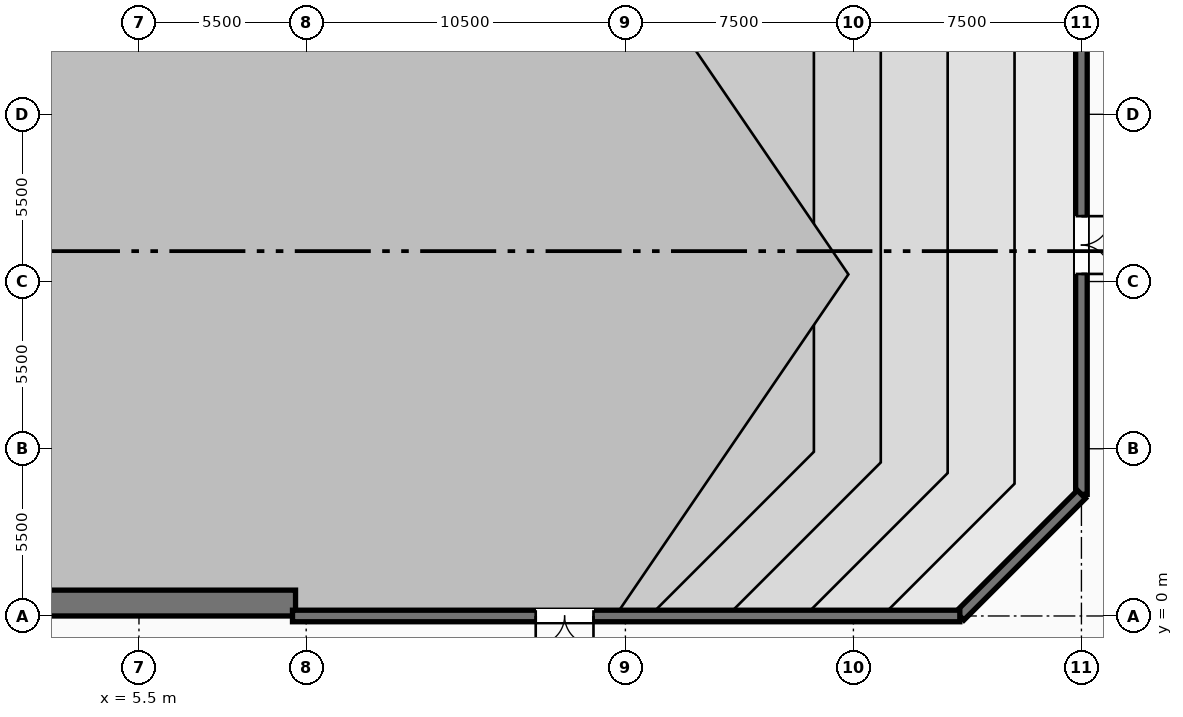
"""IFC4 building model, lengths in metres.
Left out: names, types, materials, properties, quantities, classifications, styles, units other than length and angle.
Written with IfcOpenShell. Run it as: python <this file> out.ifc"""

import sys

from ifc_helpers import new_model, si_unit, direction, frame, frame_2d, origin, origin_2d, place, context, subcontext, project, spatial, rectangle, hollow_rectangle, extrude, source, transform, mapped, element, fill, save


model = new_model("IFC4")
c1 = context("Model", 3, precision=1e-05, world=origin(), true_north=direction((0.0, 1.0)))
c2 = subcontext(c1, "Body", "Model", "MODEL_VIEW")
j1 = project(units=[si_unit("LENGTHUNIT", "METRE"), si_unit("PLANEANGLEUNIT", "RADIAN")], contexts=[c1])
p1 = place(None, origin())
s1 = spatial("IfcSite", under=j1, at=p1, CompositionType="ELEMENT")
p2 = place(p1, origin())
s2 = spatial("IfcBuilding", under=s1, at=p2, CompositionType="ELEMENT")
p3 = place(p2, origin())
s3 = spatial("IfcBuildingStorey", under=s2, at=p3, CompositionType="ELEMENT", Elevation=0.0)
p4 = place(p3, frame((-10.65, 0.425, 0.0), z_axis=(0.0, 0.0, 1.0), x_axis=(1.0, 0.0, 0.0)))
e1 = element("IfcWall", 1, at=p4, inside=s3, PredefinedType="SHEAR", context=c2, shape_type="SweptSolid", body=[
    extrude(rectangle(XDim=21.3, YDim=0.85, at=frame_2d((10.65, 0.0))), origin(), (0.0, 0.0, 1.0), 5.15),
])
p5 = place(p3, frame((-11.0, 16.175, 0.0), z_axis=(0.0, 0.0, 1.0), x_axis=(1.0, 0.0, 0.0)))
e2 = element("IfcWall", 2, at=p5, inside=s3, PredefinedType="SHEAR", context=c2, shape_type="SweptSolid", body=[
    extrude(rectangle(XDim=22.0, YDim=0.85, at=frame_2d((11.0, 0.0))), origin(), (0.0, 0.0, 1.0), 5.15),
])
p6 = place(p5, frame((3.57, 0.0, 0.0)))
e3 = element("IfcOpeningElement", 3, at=p6, cuts=e2, PredefinedType="OPENING", context=c2, shape_type="SweptSolid", body=[
    extrude(rectangle(XDim=1.3, YDim=2.3, at=frame_2d((0.65, 1.15))), frame((0.0, 0.435, 0.0), z_axis=(0.0, -1.0, 0.0), x_axis=(1.0, 0.0, 0.0)), (0.0, 0.0, 1.0), 0.87),
])
p7 = place(p5, frame((10.0, 0.0, 0.0)))
e4 = element("IfcOpeningElement", 4, at=p7, cuts=e2, PredefinedType="OPENING", context=c2, shape_type="SweptSolid", body=[
    extrude(rectangle(XDim=2.0, YDim=2.4, at=frame_2d((1.0, 1.2))), frame((0.0, 0.435, 0.0), z_axis=(0.0, -1.0, 0.0), x_axis=(1.0, 0.0, 0.0)), (0.0, 0.0, 1.0), 0.87),
])
p8 = place(p3, frame((10.575, 0.425, 0.0), z_axis=(0.0, 0.0, 1.0), x_axis=(0.0, 1.0, 0.0)))
e5 = element("IfcWall", 5, at=p8, inside=s3, PredefinedType="SHEAR", context=c2, shape_type="SweptSolid", body=[
    extrude(rectangle(XDim=15.75, YDim=0.85, at=frame_2d((7.875, 0.0))), origin(), (0.0, 0.0, 1.0), 5.15),
])
p9 = place(p8, frame((9.125, 0.0, 0.0)))
e6 = element("IfcOpeningElement", 6, at=p9, cuts=e5, PredefinedType="OPENING", context=c2, shape_type="SweptSolid", body=[
    extrude(rectangle(XDim=1.1, YDim=2.2, at=frame_2d((0.55, 1.1))), frame((0.0, 0.435, 0.0), z_axis=(0.0, -1.0, 0.0), x_axis=(1.0, 0.0, 0.0)), (0.0, 0.0, 1.0), 0.87),
])
p10 = place(p3, frame((5.5, 0.425, 0.0), z_axis=(0.0, 0.0, 1.0), x_axis=(0.0, 1.0, 0.0)))
e7 = element("IfcWall", 7, at=p10, inside=s3, PredefinedType="SHEAR", context=c2, shape_type="SweptSolid", body=[
    extrude(rectangle(XDim=15.75, YDim=0.4, at=frame_2d((7.875, 0.0))), origin(), (0.0, 0.0, 1.0), 5.15),
])
p11 = place(p10, frame((9.075, 0.0, 0.0)))
e8 = element("IfcOpeningElement", 8, at=p11, cuts=e7, PredefinedType="OPENING", context=c2, shape_type="SweptSolid", body=[
    extrude(rectangle(XDim=1.1, YDim=2.2, at=frame_2d((0.55, 1.1))), frame((0.0, 0.21, 0.0), z_axis=(0.0, -1.0, 0.0), x_axis=(1.0, 0.0, 0.0)), (0.0, 0.0, 1.0), 0.42),
])
m1 = source(origin(), c2, "Body", "SweptSolid", [
    extrude(rectangle(XDim=0.45, YDim=0.95, at=origin_2d()), origin(), (0.0, 0.0, 1.0), 5.5),
])
for number, where, z_axis, x_axis in (
    (9, (5.5, 0.45, 0.0), (0.0, 0.0, 1.0), (1.0, 0.0, 0.0)),
    (10, (10.65, 0.3, 0.0), (0.0, 0.0, 1.0), (1.0, 0.0, 0.0)),
    (11, (5.5, 16.05, 0.0), (0.0, 0.0, 1.0), (1.0, 0.0, 0.0)),
):
    element("IfcColumn", number, at=place(p3, frame(where, z_axis=z_axis, x_axis=x_axis)), inside=s3, PredefinedType="PILASTER", context=c2, shape_type="MappedRepresentation", body=[
        mapped(m1, transform((0.0, 0.0, 0.0), scale=1.0)),
    ])
m2 = source(origin(), c2, "Body", "SweptSolid", [
    extrude(rectangle(XDim=0.85, YDim=1.15, at=origin_2d()), origin(), (0.0, 0.0, 1.0), 5.5),
])
for number, where, z_axis, x_axis in (
    (12, (22.446, 0.0, 0.0), (0.0, 0.0, 1.0), (1.0, 0.0, 0.0)),
    (13, (21.5, 8.2, 0.0), (0.0, 0.0, 1.0), (1.0, 0.0, 0.0)),
    (14, (31.8, 16.5, 0.0), (0.0, 0.0, 1.0), (1.0, 0.0, 0.0)),
):
    element("IfcColumn", number, at=place(p3, frame(where, z_axis=z_axis, x_axis=x_axis)), inside=s3, PredefinedType="COLUMN", context=c2, shape_type="MappedRepresentation", body=[
        mapped(m2, transform((0.0, 0.0, 0.0), scale=1.0)),
    ])
m3 = source(origin(), c2, "Body", "SweptSolid", [
    extrude(hollow_rectangle(XDim=1.4, YDim=1.4, WallThickness=0.07, at=origin_2d()), origin(), (0.0, 0.0, 1.0), 5.5),
])
for number, where, z_axis, x_axis in (
    (15, (21.5, 16.5, 0.0), (0.0, 0.0, 1.0), (1.0, 0.0, 0.0)),
    (16, (31.8, 5.2, 0.0), (0.0, 0.0, 1.0), (1.0, 0.0, 0.0)),
    (17, (30.573, 11.687, 0.0), (0.0, 0.0, 1.0), (1.0, 0.0, 0.0)),
):
    element("IfcColumn", number, at=place(p3, frame(where, z_axis=z_axis, x_axis=x_axis)), inside=s3, PredefinedType="COLUMN", context=c2, shape_type="MappedRepresentation", body=[
        mapped(m3, transform((0.0, 0.0, 0.0), scale=1.0)),
    ])
p12 = place(p3, frame((36.5, 46.0, 0.0), z_axis=(0.0, 0.0, 1.0), x_axis=(0.0, -1.0, 0.0)))
e18 = element("IfcWall", 18, at=p12, inside=s3, PredefinedType="SOLIDWALL", context=c2, shape_type="SweptSolid", body=[
    extrude(rectangle(XDim=42.0, YDim=0.38, at=frame_2d((21.0, 0.0))), origin(), (0.0, 0.0, 1.0), 4.09),
])
p13 = place(p12, frame((32.85, 0.0, 0.0)))
e19 = element("IfcOpeningElement", 19, at=p13, cuts=e18, PredefinedType="OPENING", context=c2, shape_type="SweptSolid", body=[
    extrude(rectangle(XDim=1.9, YDim=2.3, at=frame_2d((0.95, 1.15))), frame((0.0, 0.2, 0.0), z_axis=(0.0, -1.0, 0.0), x_axis=(1.0, 0.0, 0.0)), (0.0, 0.0, 1.0), 0.4),
])
p14 = place(p12, frame((11.55, 0.0, 0.0)))
e20 = element("IfcOpeningElement", 20, at=p14, cuts=e18, PredefinedType="OPENING", context=c2, shape_type="SweptSolid", body=[
    extrude(rectangle(XDim=1.9, YDim=2.3, at=frame_2d((0.95, 1.15))), frame((0.0, 0.2, 0.0), z_axis=(0.0, -1.0, 0.0), x_axis=(1.0, 0.0, 0.0)), (0.0, 0.0, 1.0), 0.4),
])
p15 = place(p3, frame((36.5, 4.0, 0.0), z_axis=(0.0, 0.0, 1.0), x_axis=(-0.707106781187, -0.707106781187, 0.0)))
e21 = element("IfcWall", 21, at=p15, inside=s3, PredefinedType="SOLIDWALL", context=c2, shape_type="SweptSolid", body=[
    extrude(rectangle(XDim=5.657, YDim=0.38, at=frame_2d((2.828, 0.0))), origin(), (0.0, 0.0, 1.0), 4.09),
])
p16 = place(p3, frame((32.5, 0.0, 0.0), z_axis=(0.0, 0.0, 1.0), x_axis=(-1.0, 0.0, 0.0)))
e22 = element("IfcWall", 22, at=p16, inside=s3, PredefinedType="SOLIDWALL", context=c2, shape_type="SweptSolid", body=[
    extrude(rectangle(XDim=21.95, YDim=0.38, at=frame_2d((10.975, 0.0))), origin(), (0.0, 0.0, 1.0), 4.09),
])
p17 = place(p16, frame((12.05, 0.0, 0.0)))
e23 = element("IfcOpeningElement", 23, at=p17, cuts=e22, PredefinedType="OPENING", context=c2, shape_type="SweptSolid", body=[
    extrude(rectangle(XDim=1.9, YDim=2.3, at=frame_2d((0.95, 1.15))), frame((0.0, 0.2, 0.0), z_axis=(0.0, -1.0, 0.0), x_axis=(1.0, 0.0, 0.0)), (0.0, 0.0, 1.0), 0.4),
])
p18 = place(p3, frame((6.85, 0.85, 0.0), z_axis=(0.0, 0.0, 1.0), x_axis=(0.0, 1.0, 0.0)))
e24 = element("IfcWall", 24, at=p18, inside=s3, PredefinedType="SOLIDWALL", context=c2, shape_type="SweptSolid", body=[
    extrude(rectangle(XDim=7.5, YDim=0.25, at=frame_2d((3.75, 0.0))), origin(), (0.0, 0.0, 1.0), 5.15),
])
p19 = place(p3, frame((5.5, 8.35, 0.0), z_axis=(0.0, 0.0, 1.0), x_axis=(1.0, 0.0, 0.0)))
e25 = element("IfcWall", 25, at=p19, inside=s3, PredefinedType="SOLIDWALL", context=c2, shape_type="SweptSolid", body=[
    extrude(rectangle(XDim=4.65, YDim=0.22, at=frame_2d((2.325, 0.0))), origin(), (0.0, 0.0, 1.0), 5.15),
])
p20 = place(p19, frame((2.5, 0.0, 0.0)))
e26 = element("IfcOpeningElement", 26, at=p20, cuts=e25, PredefinedType="OPENING", context=c2, shape_type="SweptSolid", body=[
    extrude(rectangle(XDim=1.15, YDim=2.2, at=frame_2d((0.575, 1.1))), frame((0.0, 0.12, 0.0), z_axis=(0.0, -1.0, 0.0), x_axis=(1.0, 0.0, 0.0)), (0.0, 0.0, 1.0), 0.24),
])
p21 = place(p3, frame((10.15, 11.87, 0.0), z_axis=(0.0, 0.0, 1.0), x_axis=(-1.0, 0.0, 0.0)))
e27 = element("IfcWall", 27, at=p21, inside=s3, PredefinedType="SOLIDWALL", context=c2, shape_type="SweptSolid", body=[
    extrude(rectangle(XDim=4.65, YDim=0.25, at=frame_2d((2.325, 0.0))), origin(), (0.0, 0.0, 1.0), 5.15),
])
p22 = place(p21, frame((0.5, 0.0, 0.0)))
e28 = element("IfcOpeningElement", 28, at=p22, cuts=e27, PredefinedType="OPENING", context=c2, shape_type="SweptSolid", body=[
    extrude(rectangle(XDim=1.2, YDim=2.25, at=frame_2d((0.6, 1.125))), frame((0.0, 0.135, 0.0), z_axis=(0.0, -1.0, 0.0), x_axis=(1.0, 0.0, 0.0)), (0.0, 0.0, 1.0), 0.27),
])
p23 = place(p3, frame((7.84, 11.87, 0.0), z_axis=(0.0, 0.0, 1.0), x_axis=(0.0, 1.0, 0.0)))
e29 = element("IfcWall", 29, at=p23, inside=s3, PredefinedType="SOLIDWALL", context=c2, shape_type="SweptSolid", body=[
    extrude(rectangle(XDim=3.88, YDim=0.22, at=frame_2d((1.94, 0.0))), origin(), (0.0, 0.0, 1.0), 5.15),
])
p24 = place(p3, frame((3.54, 5.383, 0.0), z_axis=(0.0, 0.0, 1.0), x_axis=(0.0, 1.0, 0.0)))
e30 = element("IfcWall", 30, at=p24, inside=s3, PredefinedType="PARTITIONING", context=c2, shape_type="SweptSolid", body=[
    extrude(rectangle(XDim=2.875, YDim=0.165, at=frame_2d((1.438, 0.0))), origin(), (0.0, 0.0, 1.0), 5.142),
])
p25 = place(p24, frame((1.294, 0.0, 0.0)))
e31 = element("IfcOpeningElement", 31, at=p25, cuts=e30, PredefinedType="OPENING", context=c2, shape_type="SweptSolid", body=[
    extrude(rectangle(XDim=0.9, YDim=2.1, at=frame_2d((0.45, 1.05))), frame((0.0, 0.093, 0.0), z_axis=(0.0, -1.0, 0.0), x_axis=(1.0, 0.0, 0.0)), (0.0, 0.0, 1.0), 0.185),
])
p26 = place(p3, frame((3.54, 8.34, 0.0), z_axis=(0.0, 0.0, 1.0), x_axis=(1.0, 0.0, 0.0)))
e32 = element("IfcWall", 32, at=p26, inside=s3, PredefinedType="PARTITIONING", context=c2, shape_type="SweptSolid", body=[
    extrude(rectangle(XDim=1.88, YDim=0.165, at=frame_2d((0.94, 0.0))), origin(), (0.0, 0.0, 1.0), 5.142),
])
p27 = place(p3, frame((1.8, 5.3, 0.0), z_axis=(0.0, 0.0, 1.0), x_axis=(1.0, 0.0, 0.0)))
e33 = element("IfcWall", 33, at=p27, inside=s3, PredefinedType="PARTITIONING", context=c2, shape_type="SweptSolid", body=[
    extrude(rectangle(XDim=3.62, YDim=0.165, at=frame_2d((1.81, 0.0))), origin(), (0.0, 0.0, 1.0), 5.142),
])
p28 = place(p27, frame((0.48, 0.0, 0.0)))
e34 = element("IfcOpeningElement", 34, at=p28, cuts=e33, PredefinedType="OPENING", context=c2, shape_type="SweptSolid", body=[
    extrude(rectangle(XDim=0.9, YDim=2.1, at=frame_2d((0.45, 1.05))), frame((0.0, 0.093, 0.0), z_axis=(0.0, -1.0, 0.0), x_axis=(1.0, 0.0, 0.0)), (0.0, 0.0, 1.0), 0.185),
])
p29 = place(p3, frame((3.54, 11.22, 0.0), z_axis=(0.0, 0.0, 1.0), x_axis=(0.0, 1.0, 0.0)))
e35 = element("IfcWall", 35, at=p29, inside=s3, PredefinedType="PARTITIONING", context=c2, shape_type="SweptSolid", body=[
    extrude(rectangle(XDim=4.53, YDim=0.165, at=frame_2d((2.265, 0.0))), origin(), (0.0, 0.0, 1.0), 5.142),
])
p30 = place(p29, frame((0.55, 0.0, 0.0)))
e36 = element("IfcOpeningElement", 36, at=p30, cuts=e35, PredefinedType="OPENING", context=c2, shape_type="SweptSolid", body=[
    extrude(rectangle(XDim=0.9, YDim=2.1, at=frame_2d((0.45, 1.05))), frame((0.0, 0.093, 0.0), z_axis=(0.0, -1.0, 0.0), x_axis=(1.0, 0.0, 0.0)), (0.0, 0.0, 1.0), 0.185),
])
p31 = place(p29, frame((2.85, 0.0, 0.0)))
e37 = element("IfcOpeningElement", 37, at=p31, cuts=e35, PredefinedType="OPENING", context=c2, shape_type="SweptSolid", body=[
    extrude(rectangle(XDim=0.9, YDim=2.1, at=frame_2d((0.45, 1.05))), frame((0.0, 0.093, 0.0), z_axis=(0.0, -1.0, 0.0), x_axis=(1.0, 0.0, 0.0)), (0.0, 0.0, 1.0), 0.185),
])
p32 = place(p3, frame((3.54, 11.22, 0.0), z_axis=(0.0, 0.0, 1.0), x_axis=(1.0, 0.0, 0.0)))
e38 = element("IfcWall", 38, at=p32, inside=s3, PredefinedType="PARTITIONING", context=c2, shape_type="SweptSolid", body=[
    extrude(rectangle(XDim=1.88, YDim=0.165, at=frame_2d((0.94, 0.0))), origin(), (0.0, 0.0, 1.0), 5.142),
])
p33 = place(p3, frame((3.54, 13.48, 0.0), z_axis=(0.0, 0.0, 1.0), x_axis=(1.0, 0.0, 0.0)))
e39 = element("IfcWall", 39, at=p33, inside=s3, PredefinedType="PARTITIONING", context=c2, shape_type="SweptSolid", body=[
    extrude(rectangle(XDim=1.88, YDim=0.14, at=frame_2d((0.94, 0.0))), origin(), (0.0, 0.0, 1.0), 5.142),
])
for number, where, z_axis, x_axis in (
    (40, (24.48, 6.68, 0.0), (0.0, 0.0, 1.0), (0.0, 1.0, 0.0)),
    (41, (28.92, 6.68, 0.0), (0.0, 0.0, 1.0), (0.0, 1.0, 0.0)),
):
    element("IfcWall", number, at=place(p3, frame(where, z_axis=z_axis, x_axis=x_axis)), inside=s3, PredefinedType="SOLIDWALL", context=c2, shape_type="SweptSolid", body=[
        extrude(rectangle(XDim=8.44, YDim=0.25, at=frame_2d((4.22, 0.0))), origin(), (0.0, 0.0, 1.0), 5.15),
    ])
p34 = place(p3, frame((28.92, 6.68, 0.0), z_axis=(0.0, 0.0, 1.0), x_axis=(-1.0, 0.0, 0.0)))
e42 = element("IfcWall", 42, at=p34, inside=s3, PredefinedType="SOLIDWALL", context=c2, shape_type="SweptSolid", body=[
    extrude(rectangle(XDim=4.44, YDim=0.25, at=frame_2d((2.22, 0.0))), origin(), (0.0, 0.0, 1.0), 5.15),
])
p35 = place(p3, frame((24.48, 15.12, 0.0), z_axis=(0.0, 0.0, 1.0), x_axis=(1.0, 0.0, 0.0)))
e43 = element("IfcWall", 43, at=p35, inside=s3, PredefinedType="SOLIDWALL", context=c2, shape_type="SweptSolid", body=[
    extrude(rectangle(XDim=4.44, YDim=0.25, at=frame_2d((2.22, 0.0))), origin(), (0.0, 0.0, 1.0), 5.15),
])
p36 = place(p35, frame((1.645, 0.0, 0.0)))
e44 = element("IfcOpeningElement", 44, at=p36, cuts=e43, PredefinedType="OPENING", context=c2, shape_type="SweptSolid", body=[
    extrude(rectangle(XDim=1.15, YDim=2.2, at=frame_2d((0.575, 1.1))), frame((0.0, 0.135, 0.0), z_axis=(0.0, -1.0, 0.0), x_axis=(1.0, 0.0, 0.0)), (0.0, 0.0, 1.0), 0.27),
])
p37 = place(p3, frame((11.02, 5.8, 0.0), z_axis=(0.0, 0.0, 1.0), x_axis=(1.0, 0.0, 0.0)))
e45 = element("IfcWall", 45, at=p37, inside=s3, PredefinedType="SOLIDWALL", context=c2, shape_type="SweptSolid", body=[
    extrude(rectangle(XDim=6.18, YDim=0.22, at=frame_2d((3.09, 0.0))), origin(), (0.0, 0.0, 1.0), 5.142),
])
p38 = place(p37, frame((2.54, 0.0, 0.0)))
e46 = element("IfcOpeningElement", 46, at=p38, cuts=e45, PredefinedType="OPENING", context=c2, shape_type="SweptSolid", body=[
    extrude(rectangle(XDim=1.1, YDim=2.2, at=frame_2d((0.55, 1.1))), frame((0.0, 0.12, 0.0), z_axis=(0.0, -1.0, 0.0), x_axis=(1.0, 0.0, 0.0)), (0.0, 0.0, 1.0), 0.24),
])
p39 = place(p3, frame((17.2, 0.01, 0.0), z_axis=(0.0, 0.0, 1.0), x_axis=(0.0, 1.0, 0.0)))
e47 = element("IfcWall", 47, at=p39, inside=s3, PredefinedType="SOLIDWALL", context=c2, shape_type="SweptSolid", body=[
    extrude(rectangle(XDim=5.79, YDim=0.22, at=frame_2d((2.895, 0.0))), origin(), (0.0, 0.0, 1.0), 4.102),
])
p40 = place(p3, frame((10.65, 17.65, 0.0), z_axis=(0.0, 0.0, 1.0), x_axis=(1.0, 0.0, 0.0)))
e48 = element("IfcWall", 48, at=p40, inside=s3, PredefinedType="SOLIDWALL", context=c2, shape_type="SweptSolid", body=[
    extrude(rectangle(XDim=25.84, YDim=0.22, at=frame_2d((12.92, 0.0))), origin(), (0.0, 0.0, 1.0), 4.102),
])
p41 = place(p40, frame((6.835, 0.0, 0.0)))
e49 = element("IfcOpeningElement", 49, at=p41, cuts=e48, PredefinedType="OPENING", context=c2, shape_type="SweptSolid", body=[
    extrude(rectangle(XDim=1.1, YDim=2.2, at=frame_2d((0.55, 1.1))), frame((0.0, 0.12, 0.0), z_axis=(0.0, -1.0, 0.0), x_axis=(1.0, 0.0, 0.0)), (0.0, 0.0, 1.0), 0.24),
])
p42 = place(p3, frame((10.65, 15.8, 0.0), z_axis=(0.0, 0.0, 1.0), x_axis=(0.0, 1.0, 0.0)))
e50 = element("IfcWall", 50, at=p42, inside=s3, PredefinedType="SOLIDWALL", context=c2, shape_type="SweptSolid", body=[
    extrude(rectangle(XDim=1.85, YDim=0.22, at=frame_2d((0.925, 0.0))), origin(), (0.0, 0.0, 1.0), 4.102),
])
p43 = place(p3, frame((24.68, 17.65, 0.0), z_axis=(0.0, 0.0, 1.0), x_axis=(0.0, 1.0, 0.0)))
e51 = element("IfcWall", 51, at=p43, inside=s3, PredefinedType="PARTITIONING", context=c2, shape_type="SweptSolid", body=[
    extrude(rectangle(XDim=11.63, YDim=0.165, at=frame_2d((5.815, 0.0))), origin(), (0.0, 0.0, 1.0), 4.215),
])
p44 = place(p43, frame((4.815, 0.0, 0.0)))
e52 = element("IfcOpeningElement", 52, at=p44, cuts=e51, PredefinedType="OPENING", context=c2, shape_type="SweptSolid", body=[
    extrude(rectangle(XDim=2.0, YDim=2.4, at=frame_2d((1.0, 1.2))), frame((0.0, 0.093, 0.0), z_axis=(0.0, -1.0, 0.0), x_axis=(1.0, 0.0, 0.0)), (0.0, 0.0, 1.0), 0.185),
])
m4 = source(origin(), c2, "Body", "SweptSolid", [
    extrude(rectangle(XDim=1.9, YDim=2.3, at=frame_2d((0.95, 1.15))), frame((0.0, 0.025, 0.0), z_axis=(0.0, -1.0, 0.0), x_axis=(1.0, 0.0, 0.0)), (0.0, 0.0, 1.0), 0.05),
])
p45 = place(p13, origin())
e53 = element("IfcDoor", 53, at=p45, inside=s3, OperationType="DOUBLE_DOOR_SINGLE_SWING", PredefinedType="DOOR", context=c2, shape_type="MappedRepresentation", body=[
    mapped(m4, transform((0.0, 0.0, 0.0), scale=1.0)),
])
fill(e19, e53)
p46 = place(p17, origin())
e54 = element("IfcDoor", 54, at=p46, inside=s3, OperationType="DOUBLE_DOOR_SINGLE_SWING", PredefinedType="DOOR", context=c2, shape_type="MappedRepresentation", body=[
    mapped(m4, transform((0.0, 0.0, 0.0), scale=1.0)),
])
fill(e23, e54)
m5 = source(origin(), c2, "Body", "SweptSolid", [
    extrude(rectangle(XDim=1.15, YDim=2.2, at=frame_2d((0.575, 1.1))), frame((0.0, 0.025, 0.0), z_axis=(0.0, -1.0, 0.0), x_axis=(1.0, 0.0, 0.0)), (0.0, 0.0, 1.0), 0.05),
])
p47 = place(p20, origin())
e55 = element("IfcDoor", 55, at=p47, inside=s3, OperationType="SINGLE_SWING_LEFT", PredefinedType="DOOR", context=c2, shape_type="MappedRepresentation", body=[
    mapped(m5, transform((0.0, 0.0, 0.0), scale=1.0)),
])
fill(e26, e55)
m6 = source(origin(), c2, "Body", "SweptSolid", [
    extrude(rectangle(XDim=1.1, YDim=2.2, at=frame_2d((0.55, 1.1))), frame((0.0, 0.025, 0.0), z_axis=(0.0, -1.0, 0.0), x_axis=(1.0, 0.0, 0.0)), (0.0, 0.0, 1.0), 0.05),
])
p48 = place(p11, origin())
e56 = element("IfcDoor", 56, at=p48, inside=s3, OperationType="SINGLE_SWING_RIGHT", PredefinedType="DOOR", context=c2, shape_type="MappedRepresentation", body=[
    mapped(m6, transform((0.0, 0.0, 0.0), scale=1.0)),
])
fill(e8, e56)
p49 = place(p9, origin())
e57 = element("IfcDoor", 57, at=p49, inside=s3, OperationType="SINGLE_SWING_RIGHT", PredefinedType="DOOR", context=c2, shape_type="MappedRepresentation", body=[
    mapped(m6, transform((0.0, 0.0, 0.0), scale=1.0)),
])
fill(e6, e57)
m7 = source(origin(), c2, "Body", "SweptSolid", [
    extrude(rectangle(XDim=1.2, YDim=2.25, at=frame_2d((0.6, 1.125))), frame((0.0, 0.025, 0.0), z_axis=(0.0, -1.0, 0.0), x_axis=(1.0, 0.0, 0.0)), (0.0, 0.0, 1.0), 0.05),
])
p50 = place(p22, origin())
e58 = element("IfcDoor", 58, at=p50, inside=s3, OperationType="SLIDING_TO_RIGHT", PredefinedType="DOOR", context=c2, shape_type="MappedRepresentation", body=[
    mapped(m7, transform((0.0, 0.0, 0.0), scale=1.0)),
])
fill(e28, e58)
m8 = source(origin(), c2, "Body", "SweptSolid", [
    extrude(rectangle(XDim=0.9, YDim=2.1, at=frame_2d((0.45, 1.05))), frame((0.0, 0.025, 0.0), z_axis=(0.0, -1.0, 0.0), x_axis=(1.0, 0.0, 0.0)), (0.0, 0.0, 1.0), 0.05),
])
p51 = place(p28, origin())
e59 = element("IfcDoor", 59, at=p51, inside=s3, OperationType="SINGLE_SWING_LEFT", PredefinedType="DOOR", context=c2, shape_type="MappedRepresentation", body=[
    mapped(m8, transform((0.0, 0.0, 0.0), scale=1.0)),
])
fill(e34, e59)
p52 = place(p25, origin())
e60 = element("IfcDoor", 60, at=p52, inside=s3, OperationType="SINGLE_SWING_RIGHT", PredefinedType="DOOR", context=c2, shape_type="MappedRepresentation", body=[
    mapped(m8, transform((0.0, 0.0, 0.0), scale=1.0)),
])
fill(e31, e60)
p53 = place(p30, origin())
e61 = element("IfcDoor", 61, at=p53, inside=s3, OperationType="SINGLE_SWING_LEFT", PredefinedType="DOOR", context=c2, shape_type="MappedRepresentation", body=[
    mapped(m8, transform((0.0, 0.0, 0.0), scale=1.0)),
])
fill(e36, e61)
p54 = place(p31, origin())
e62 = element("IfcDoor", 62, at=p54, inside=s3, OperationType="SINGLE_SWING_RIGHT", PredefinedType="DOOR", context=c2, shape_type="MappedRepresentation", body=[
    mapped(m8, transform((0.0, 0.0, 0.0), scale=1.0)),
])
fill(e37, e62)
p55 = place(p36, origin())
e63 = element("IfcDoor", 63, at=p55, inside=s3, OperationType="SINGLE_SWING_RIGHT", PredefinedType="DOOR", context=c2, shape_type="MappedRepresentation", body=[
    mapped(m5, transform((0.0, 0.0, 0.0), scale=1.0)),
])
fill(e44, e63)
p56 = place(p38, origin())
e64 = element("IfcDoor", 64, at=p56, inside=s3, OperationType="SINGLE_SWING_LEFT", PredefinedType="DOOR", context=c2, shape_type="MappedRepresentation", body=[
    mapped(m6, transform((0.0, 0.0, 0.0), scale=1.0)),
])
fill(e46, e64)
p57 = place(p41, origin())
e65 = element("IfcDoor", 65, at=p57, inside=s3, OperationType="SINGLE_SWING_LEFT", PredefinedType="DOOR", context=c2, shape_type="MappedRepresentation", body=[
    mapped(m6, transform((0.0, 0.0, 0.0), scale=1.0)),
])
fill(e49, e65)
save(model, sys.argv[1])
